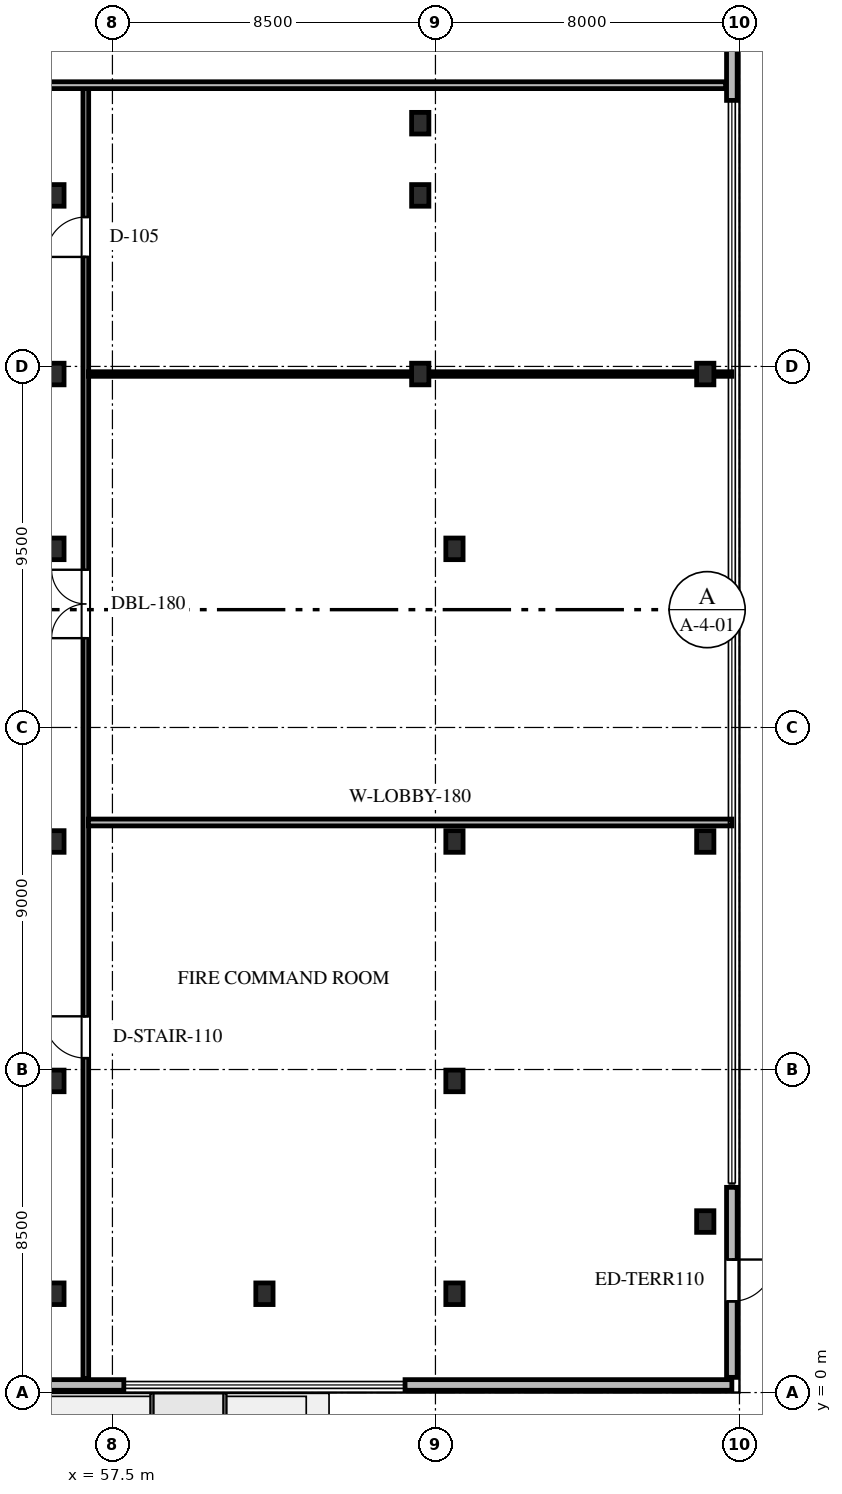
"""IFC4 building model, lengths in metres.
Left out: names, types, materials, properties, quantities, classifications, styles, units other than length and angle.
Written with IfcOpenShell. Run it as: python <this file> out.ifc"""

import sys

from ifc_helpers import new_model, si_unit, direction, frame, frame_2d, origin, origin_2d, place, context, subcontext, project, spatial, rectangle, i_section, extrude, element, fill, save


model = new_model("IFC4")
c1 = context("Model", 3, precision=1e-05, world=origin(), true_north=direction((0.0, 1.0)))
c2 = subcontext(c1, "Body", "Model", "MODEL_VIEW")
j1 = project(units=[si_unit("LENGTHUNIT", "METRE"), si_unit("PLANEANGLEUNIT", "RADIAN")], contexts=[c1])
p1 = place(None, origin())
s1 = spatial("IfcSite", under=j1, at=p1, CompositionType="ELEMENT")
p2 = place(p1, origin())
s2 = spatial("IfcBuilding", under=s1, at=p2, CompositionType="ELEMENT")
p3 = place(p2, origin())
s3 = spatial("IfcBuildingStorey", under=s2, at=p3, CompositionType="ELEMENT", Elevation=0.0)
for number, where, z_axis, x_axis in (
    (1, (56.0, 2.6, 0.0), (0.0, 0.0, 1.0), (1.0, 0.0, 0.0)),
    (2, (61.5, 2.6, 0.0), (0.0, 0.0, 1.0), (1.0, 0.0, 0.0)),
    (3, (66.5, 2.6, 0.0), (0.0, 0.0, 1.0), (1.0, 0.0, 0.0)),
    (4, (56.0, 8.2, 0.0), (0.0, 0.0, 1.0), (1.0, 0.0, 0.0)),
    (5, (66.5, 8.2, 0.0), (0.0, 0.0, 1.0), (1.0, 0.0, 0.0)),
    (6, (56.0, 14.5, 0.0), (0.0, 0.0, 1.0), (1.0, 0.0, 0.0)),
    (7, (66.5, 14.5, 0.0), (0.0, 0.0, 1.0), (1.0, 0.0, 0.0)),
    (8, (56.0, 22.2, 0.0), (0.0, 0.0, 1.0), (1.0, 0.0, 0.0)),
    (9, (66.5, 22.2, 0.0), (0.0, 0.0, 1.0), (1.0, 0.0, 0.0)),
    (10, (56.0, 26.8, 0.0), (0.0, 0.0, 1.0), (1.0, 0.0, 0.0)),
    (11, (65.6, 26.8, 0.0), (0.0, 0.0, 1.0), (1.0, 0.0, 0.0)),
    (12, (56.0, 31.5, 0.0), (0.0, 0.0, 1.0), (1.0, 0.0, 0.0)),
    (13, (65.6, 31.5, 0.0), (0.0, 0.0, 1.0), (1.0, 0.0, 0.0)),
    (14, (73.1, 4.5, 0.0), (0.0, 0.0, 1.0), (1.0, 0.0, 0.0)),
    (15, (73.1, 14.5, 0.0), (0.0, 0.0, 1.0), (1.0, 0.0, 0.0)),
    (16, (73.1, 26.8, 0.0), (0.0, 0.0, 1.0), (1.0, 0.0, 0.0)),
    (17, (65.6, 33.4, 0.0), (0.0, 0.0, 1.0), (1.0, 0.0, 0.0)),
):
    element("IfcColumn", number, at=place(p3, frame(where, z_axis=z_axis, x_axis=x_axis)), inside=s3, PredefinedType="COLUMN", context=c2, shape_type="SweptSolid", body=[
        extrude(i_section(OverallWidth=0.454, OverallDepth=0.569, WebThickness=0.078, FlangeThickness=0.125, FilletRadius=0.03, at=origin_2d()), origin(), (0.0, 0.0, 1.0), 5.4),
    ])
p4 = place(p3, frame((73.8, 5.4, 0.0), z_axis=(0.0, 0.0, 1.0), x_axis=(0.0, -1.0, 0.0)))
e18 = element("IfcWall", 18, at=p4, inside=s3, PredefinedType="STANDARD", context=c2, shape_type="SweptSolid", body=[
    extrude(rectangle(XDim=5.0, YDim=0.28, at=frame_2d((2.5, 0.0))), origin(), (0.0, 0.0, 1.0), 5.13),
])
p5 = place(p4, frame((1.9, 0.0, 0.0)))
e19 = element("IfcOpeningElement", 19, at=p5, cuts=e18, PredefinedType="OPENING", context=c2, shape_type="SweptSolid", body=[
    extrude(rectangle(XDim=1.1, YDim=2.2, at=frame_2d((0.55, 1.1))), frame((0.0, 0.15, 0.0), z_axis=(0.0, -1.0, 0.0), x_axis=(1.0, 0.0, 0.0)), (0.0, 0.0, 1.0), 0.3),
])
p6 = place(p3, frame((57.8, 0.2, 0.0), z_axis=(0.0, 0.0, 1.0), x_axis=(-1.0, 0.0, 0.0)))
e20 = element("IfcWall", 20, at=p6, inside=s3, PredefinedType="STANDARD", context=c2, shape_type="SweptSolid", body=[
    extrude(rectangle(XDim=3.0, YDim=0.28, at=frame_2d((1.5, 0.0))), origin(), (0.0, 0.0, 1.0), 5.13),
])
p7 = place(p3, frame((73.8, 0.2, 0.0), z_axis=(0.0, 0.0, 1.0), x_axis=(-1.0, 0.0, 0.0)))
e21 = element("IfcWall", 21, at=p7, inside=s3, PredefinedType="STANDARD", context=c2, shape_type="SweptSolid", body=[
    extrude(rectangle(XDim=8.6, YDim=0.28, at=frame_2d((4.3, 0.0))), origin(), (0.0, 0.0, 1.0), 5.13),
])
p8 = place(p3, frame((73.8, 34.0, 0.0), z_axis=(0.0, 0.0, 1.0), x_axis=(0.0, 1.0, 0.0)))
e22 = element("IfcWall", 22, at=p8, inside=s3, PredefinedType="STANDARD", context=c2, shape_type="SweptSolid", body=[
    extrude(rectangle(XDim=15.8, YDim=0.28, at=frame_2d((7.9, 0.0))), origin(), (0.0, 0.0, 1.0), 5.13),
])
p9 = place(p3, frame((56.8, 0.365, 0.0), z_axis=(0.0, 0.0, 1.0), x_axis=(0.0, 1.0, 0.0)))
e23 = element("IfcWall", 23, at=p9, inside=s3, PredefinedType="PARTITIONING", context=c2, shape_type="SweptSolid", body=[
    extrude(rectangle(XDim=33.967, YDim=0.15, at=frame_2d((16.983, 0.0))), origin(), (0.0, 0.0, 1.0), 4.182),
])
p10 = place(p9, frame((8.435, 0.0, 0.0)))
e24 = element("IfcOpeningElement", 24, at=p10, cuts=e23, PredefinedType="OPENING", context=c2, shape_type="SweptSolid", body=[
    extrude(rectangle(XDim=1.1, YDim=2.2, at=frame_2d((0.55, 1.1))), frame((0.0, 0.085, 0.0), z_axis=(0.0, -1.0, 0.0), x_axis=(1.0, 0.0, 0.0)), (0.0, 0.0, 1.0), 0.17),
])
p11 = place(p9, frame((19.485, 0.0, 0.0)))
e25 = element("IfcOpeningElement", 25, at=p11, cuts=e23, PredefinedType="OPENING", context=c2, shape_type="SweptSolid", body=[
    extrude(rectangle(XDim=1.8, YDim=2.2, at=frame_2d((0.9, 1.1))), frame((0.0, 0.085, 0.0), z_axis=(0.0, -1.0, 0.0), x_axis=(1.0, 0.0, 0.0)), (0.0, 0.0, 1.0), 0.17),
])
p12 = place(p9, frame((29.516, 0.0, 0.0)))
e26 = element("IfcOpeningElement", 26, at=p12, cuts=e23, PredefinedType="OPENING", context=c2, shape_type="SweptSolid", body=[
    extrude(rectangle(XDim=1.05, YDim=2.2, at=frame_2d((0.525, 1.1))), frame((0.0, 0.085, 0.0), z_axis=(0.0, -1.0, 0.0), x_axis=(1.0, 0.0, 0.0)), (0.0, 0.0, 1.0), 0.17),
])
p13 = place(p3, frame((56.868, 15.0, 0.0), z_axis=(0.0, 0.0, 1.0), x_axis=(1.0, 0.0, 0.0)))
e27 = element("IfcWall", 27, at=p13, inside=s3, PredefinedType="STANDARD", context=c2, shape_type="SweptSolid", body=[
    extrude(rectangle(XDim=16.932, YDim=0.18, at=frame_2d((8.466, 0.0))), origin(), (0.0, 0.0, 1.0), 4.182),
])
p14 = place(p3, frame((56.868, 26.8, 0.0), z_axis=(0.0, 0.0, 1.0), x_axis=(1.0, 0.0, 0.0)))
e28 = element("IfcWall", 28, at=p14, inside=s3, PredefinedType="PARTITIONING", context=c2, shape_type="SweptSolid", body=[
    extrude(rectangle(XDim=16.932, YDim=0.12, at=frame_2d((8.466, 0.0))), origin(), (0.0, 0.0, 1.0), 4.182),
])
p15 = place(p3, frame((51.2, 34.4, 0.0), z_axis=(0.0, 0.0, 1.0), x_axis=(1.0, 0.0, 0.0)))
e29 = element("IfcWall", 29, at=p15, inside=s3, PredefinedType="STANDARD", context=c2, shape_type="SweptSolid", body=[
    extrude(rectangle(XDim=22.435, YDim=0.18, at=frame_2d((11.218, 0.0))), origin(), (0.0, 0.0, 1.0), 4.182),
])
p16 = place(p5, origin())
e30 = element("IfcDoor", 30, at=p16, inside=s3, OperationType="SINGLE_SWING_LEFT", PredefinedType="DOOR", context=c2, shape_type="SweptSolid", body=[
    extrude(rectangle(XDim=1.1, YDim=2.2, at=frame_2d((0.55, 1.1))), frame((0.0, 0.025, 0.0), z_axis=(0.0, -1.0, 0.0), x_axis=(1.0, 0.0, 0.0)), (0.0, 0.0, 1.0), 0.05),
])
fill(e19, e30)
p17 = place(p10, origin())
e31 = element("IfcDoor", 31, at=p17, inside=s3, OperationType="SINGLE_SWING_RIGHT", PredefinedType="DOOR", context=c2, shape_type="SweptSolid", body=[
    extrude(rectangle(XDim=1.1, YDim=2.2, at=frame_2d((0.55, 1.1))), frame((0.0, 0.025, 0.0), z_axis=(0.0, -1.0, 0.0), x_axis=(1.0, 0.0, 0.0)), (0.0, 0.0, 1.0), 0.05),
])
fill(e24, e31)
p18 = place(p11, origin())
e32 = element("IfcDoor", 32, at=p18, inside=s3, OperationType="DOUBLE_DOOR_SINGLE_SWING", PredefinedType="DOOR", context=c2, shape_type="SweptSolid", body=[
    extrude(rectangle(XDim=1.8, YDim=2.2, at=frame_2d((0.9, 1.1))), frame((0.0, 0.025, 0.0), z_axis=(0.0, -1.0, 0.0), x_axis=(1.0, 0.0, 0.0)), (0.0, 0.0, 1.0), 0.05),
])
fill(e25, e32)
p19 = place(p12, origin())
e33 = element("IfcDoor", 33, at=p19, inside=s3, OperationType="SINGLE_SWING_LEFT", PredefinedType="DOOR", context=c2, shape_type="SweptSolid", body=[
    extrude(rectangle(XDim=1.05, YDim=2.2, at=frame_2d((0.525, 1.1))), frame((0.0, 0.025, 0.0), z_axis=(0.0, -1.0, 0.0), x_axis=(1.0, 0.0, 0.0)), (0.0, 0.0, 1.0), 0.05),
])
fill(e26, e33)
save(model, sys.argv[1])
